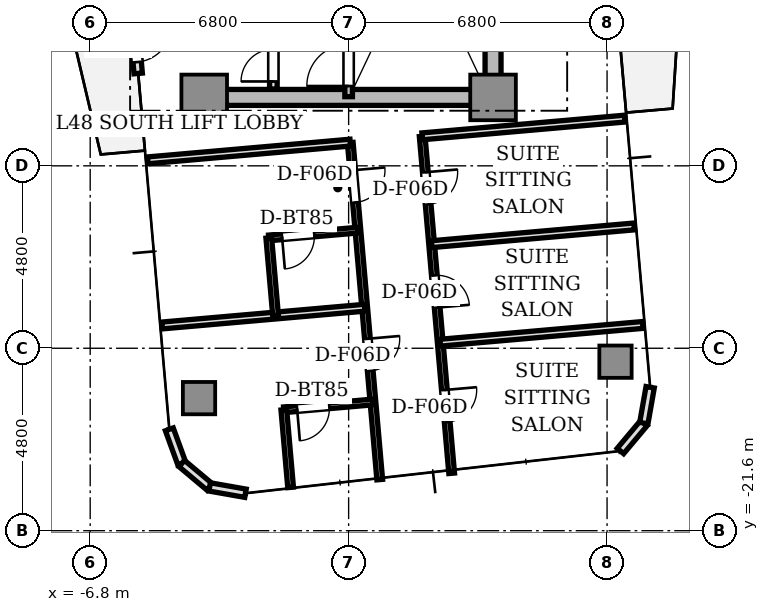
"""IFC4 building model, lengths in metres.
Left out: names, types, materials, properties, quantities, classifications, styles, units other than length and angle.
Written with IfcOpenShell. Run it as: python <this file> out.ifc"""

import sys

from ifc_helpers import new_model, si_unit, direction, frame, frame_2d, origin, origin_2d, place, context, subcontext, project, spatial, rectangle, extrude, source, transform, mapped, element, fill, save


model = new_model("IFC4")
c1 = context("Model", 3, precision=1e-05, world=origin(), true_north=direction((0.0, 1.0)))
c2 = subcontext(c1, "Body", "Model", "MODEL_VIEW")
j1 = project(units=[si_unit("LENGTHUNIT", "METRE"), si_unit("PLANEANGLEUNIT", "RADIAN")], contexts=[c1])
p1 = place(None, origin())
s1 = spatial("IfcSite", under=j1, at=p1, CompositionType="ELEMENT")
p2 = place(p1, origin())
s2 = spatial("IfcBuilding", under=s1, at=p2, CompositionType="ELEMENT")
p3 = place(p2, frame((0.0, 0.0, 175.2)))
s3 = spatial("IfcBuildingStorey", under=s2, at=p3, CompositionType="ELEMENT", Elevation=175.2)
p4 = place(p3, frame((-3.55, -10.2, 0.0), z_axis=(0.0, 0.0, 1.0), x_axis=(1.0, 0.0, 0.0)))
e1 = element("IfcWall", 1, at=p4, inside=s3, PredefinedType="SHEAR", context=c2, shape_type="SweptSolid", body=[
    extrude(rectangle(XDim=7.1, YDim=0.42, at=frame_2d((3.55, 0.0))), origin(), (0.0, 0.0, 1.0), 3.11),
])
p5 = place(p3, frame((3.8, -9.75, 0.0), z_axis=(0.0, 0.0, 1.0), x_axis=(0.0, 1.0, 0.0)))
e2 = element("IfcWall", 2, at=p5, inside=s3, PredefinedType="SHEAR", context=c2, shape_type="SweptSolid", body=[
    extrude(rectangle(XDim=6.9, YDim=0.42, at=frame_2d((3.45, 0.0))), origin(), (0.0, 0.0, 1.0), 3.11),
])
m1 = source(origin(), c2, "Body", "SweptSolid", [
    extrude(rectangle(XDim=1.2, YDim=1.2, at=origin_2d()), origin(), (0.0, 0.0, 1.0), 3.11),
])
for number, where, z_axis, x_axis in (
    (3, (-3.8, -10.2, 0.0), (0.0, 0.0, 1.0), (1.0, 0.0, 0.0)),
    (4, (3.8, -10.2, 0.0), (0.0, 0.0, 1.0), (1.0, 0.0, 0.0)),
):
    element("IfcColumn", number, at=place(p3, frame(where, z_axis=z_axis, x_axis=x_axis)), inside=s3, PredefinedType="COLUMN", context=c2, shape_type="MappedRepresentation", body=[
        mapped(m1, transform((0.0, 0.0, 0.0), scale=1.0)),
    ])
m2 = source(origin(), c2, "Body", "SweptSolid", [
    extrude(rectangle(XDim=0.85, YDim=0.85, at=origin_2d()), origin(), (0.0, 0.0, 1.0), 3.11),
])
for number, where, z_axis, x_axis in (
    (5, (-3.936, -18.112, 0.0), (0.0, 0.0, 1.0), (1.0, 0.0, 0.0)),
    (6, (7.022, -17.153, 0.0), (0.0, 0.0, 1.0), (1.0, 0.0, 0.0)),
):
    element("IfcColumn", number, at=place(p3, frame(where, z_axis=z_axis, x_axis=x_axis)), inside=s3, PredefinedType="COLUMN", context=c2, shape_type="MappedRepresentation", body=[
        mapped(m2, transform((0.0, 0.0, 0.0), scale=1.0)),
    ])
p6 = place(p3, frame((-5.772, -6.879, 0.0), z_axis=(0.0, 0.0, 1.0), x_axis=(0.087168071984, -0.996193619346, 0.0)))
e7 = element("IfcWall", 7, at=p6, inside=s3, PredefinedType="STANDARD", context=c2, shape_type="SweptSolid", body=[
    extrude(rectangle(XDim=2.7, YDim=0.22, at=frame_2d((1.35, 0.0))), origin(), (0.0, 0.0, 1.0), 3.11),
])
p7 = place(p6, frame((1.4, 0.0, 0.0)))
e8 = element("IfcOpeningElement", 8, at=p7, cuts=e7, PredefinedType="OPENING", context=c2, shape_type="SweptSolid", body=[
    extrude(rectangle(XDim=1.0, YDim=2.2, at=frame_2d((0.5, 1.1))), frame((0.0, 0.12, 0.0), z_axis=(0.0, -1.0, 0.0), x_axis=(1.0, 0.0, 0.0)), (0.0, 0.0, 1.0), 0.24),
])
p8 = place(p3, frame((-4.718, -18.933, 0.0), z_axis=(0.0, 0.0, 1.0), x_axis=(0.34188635151, -0.939741306239, 0.0)))
e9 = element("IfcWall", 9, at=p8, inside=s3, PredefinedType="STANDARD", context=c2, shape_type="SweptSolid", body=[
    extrude(rectangle(XDim=0.958, YDim=0.22, at=frame_2d((0.479, 0.0))), origin(), (0.0, 0.0, 1.0), 3.11),
])
for number, where, z_axis, x_axis in (
    (10, (-4.39, -19.833, 0.0), (0.0, 0.0, 1.0), (0.766, -0.643, 0.0)),
    (11, (-3.657, -20.449, 0.0), (0.0, 0.0, 1.0), (0.985, -0.174, 0.0)),
):
    element("IfcWall", number, at=place(p3, frame(where, z_axis=z_axis, x_axis=x_axis)), inside=s3, PredefinedType="STANDARD", context=c2, shape_type="SweptSolid", body=[
        extrude(rectangle(XDim=0.958, YDim=0.22, at=frame_2d((0.479, 0.0))), origin(), (0.0, 0.0, 1.0), 3.11),
    ])
for number, where, z_axis, x_axis in (
    (12, (7.152, -19.503, 0.0), (0.0, 0.0, 1.0), (0.643, 0.766, 0.0)),
    (13, (7.768, -18.769, 0.0), (0.0, 0.0, 1.0), (0.174, 0.985, 0.0)),
):
    element("IfcWall", number, at=place(p3, frame(where, z_axis=z_axis, x_axis=x_axis)), inside=s3, PredefinedType="STANDARD", context=c2, shape_type="SweptSolid", body=[
        extrude(rectangle(XDim=0.958, YDim=0.22, at=frame_2d((0.479, 0.0))), origin(), (0.0, 0.0, 1.0), 3.11),
    ])
p9 = place(p3, frame((0.0, -10.18, 0.0), z_axis=(0.0, 0.0, 1.0), x_axis=(0.0, 1.0, 0.0)))
e14 = element("IfcWall", 14, at=p9, inside=s3, PredefinedType="SOLIDWALL", context=c2, shape_type="SweptSolid", body=[
    extrude(rectangle(XDim=7.68, YDim=0.2, at=frame_2d((3.84, 0.0))), origin(), (0.0, 0.0, 1.0), 3.11),
])
p10 = place(p9, frame((0.28, 0.0, 0.0)))
e15 = element("IfcOpeningElement", 15, at=p10, cuts=e14, PredefinedType="OPENING", context=c2, shape_type="SweptSolid", body=[
    extrude(rectangle(XDim=1.1, YDim=2.15, at=frame_2d((0.55, 1.075))), frame((0.0, 0.11, 0.0), z_axis=(0.0, -1.0, 0.0), x_axis=(1.0, 0.0, 0.0)), (0.0, 0.0, 1.0), 0.22),
])
p11 = place(p3, frame((-1.98, -9.98, 0.0), z_axis=(0.0, 0.0, 1.0), x_axis=(0.0, 1.0, 0.0)))
e16 = element("IfcWall", 16, at=p11, inside=s3, PredefinedType="SOLIDWALL", context=c2, shape_type="SweptSolid", body=[
    extrude(rectangle(XDim=4.66, YDim=0.2, at=frame_2d((2.33, 0.0))), origin(), (0.0, 0.0, 1.0), 2.66),
])
p12 = place(p11, frame((0.2, 0.0, 0.0)))
e17 = element("IfcOpeningElement", 17, at=p12, cuts=e16, PredefinedType="OPENING", context=c2, shape_type="SweptSolid", body=[
    extrude(rectangle(XDim=0.85, YDim=2.1, at=frame_2d((0.425, 1.05))), frame((0.0, 0.11, 0.0), z_axis=(0.0, -1.0, 0.0), x_axis=(1.0, 0.0, 0.0)), (0.0, 0.0, 1.0), 0.22),
])
p13 = place(p3, frame((1.936, -11.224, 0.0), z_axis=(0.0, 0.0, 1.0), x_axis=(0.087151636982, -0.996195057291, 0.0)))
e18 = element("IfcWall", 18, at=p13, inside=s3, PredefinedType="PARTITIONING", context=c2, shape_type="SweptSolid", body=[
    extrude(rectangle(XDim=8.9, YDim=0.15, at=frame_2d((4.45, 0.0))), origin(), (0.0, 0.0, 1.0), 2.66),
])
p14 = place(p13, frame((0.949, 0.0, 0.0)))
e19 = element("IfcOpeningElement", 19, at=p14, cuts=e18, PredefinedType="OPENING", context=c2, shape_type="SweptSolid", body=[
    extrude(rectangle(XDim=0.85, YDim=2.1, at=frame_2d((0.425, 1.05))), frame((0.0, 0.085, 0.0), z_axis=(0.0, -1.0, 0.0), x_axis=(1.0, 0.0, 0.0)), (0.0, 0.0, 1.0), 0.17),
])
p15 = place(p13, frame((3.674, 0.0, 0.0)))
e20 = element("IfcOpeningElement", 20, at=p15, cuts=e18, PredefinedType="OPENING", context=c2, shape_type="SweptSolid", body=[
    extrude(rectangle(XDim=0.85, YDim=2.1, at=frame_2d((0.425, 1.05))), frame((0.0, 0.085, 0.0), z_axis=(0.0, -1.0, 0.0), x_axis=(1.0, 0.0, 0.0)), (0.0, 0.0, 1.0), 0.17),
])
p16 = place(p13, frame((6.7, 0.0, 0.0)))
e21 = element("IfcOpeningElement", 21, at=p16, cuts=e18, PredefinedType="OPENING", context=c2, shape_type="SweptSolid", body=[
    extrude(rectangle(XDim=0.85, YDim=2.1, at=frame_2d((0.425, 1.05))), frame((0.0, 0.085, 0.0), z_axis=(0.0, -1.0, 0.0), x_axis=(1.0, 0.0, 0.0)), (0.0, 0.0, 1.0), 0.17),
])
p17 = place(p3, frame((0.043, -11.39, 0.0), z_axis=(0.0, 0.0, 1.0), x_axis=(0.087178860582, -0.996192675273, 0.0)))
e22 = element("IfcWall", 22, at=p17, inside=s3, PredefinedType="PARTITIONING", context=c2, shape_type="SweptSolid", body=[
    extrude(rectangle(XDim=8.9, YDim=0.15, at=frame_2d((4.45, 0.0))), origin(), (0.0, 0.0, 1.0), 2.66),
])
p18 = place(p17, frame((0.73, 0.0, 0.0)))
e23 = element("IfcOpeningElement", 23, at=p18, cuts=e22, PredefinedType="OPENING", context=c2, shape_type="SweptSolid", body=[
    extrude(rectangle(XDim=0.85, YDim=2.1, at=frame_2d((0.425, 1.05))), frame((0.0, 0.085, 0.0), z_axis=(0.0, -1.0, 0.0), x_axis=(1.0, 0.0, 0.0)), (0.0, 0.0, 1.0), 0.17),
])
p19 = place(p17, frame((5.181, 0.0, 0.0)))
e24 = element("IfcOpeningElement", 24, at=p19, cuts=e22, PredefinedType="OPENING", context=c2, shape_type="SweptSolid", body=[
    extrude(rectangle(XDim=0.85, YDim=2.1, at=frame_2d((0.425, 1.05))), frame((0.0, 0.085, 0.0), z_axis=(0.0, -1.0, 0.0), x_axis=(1.0, 0.0, 0.0)), (0.0, 0.0, 1.0), 0.17),
])
for number, where, z_axis, x_axis in (
    (25, (1.936, -11.224, 0.0), (0.0, 0.0, 1.0), (0.996, 0.087, 0.0)),
    (26, (-5.287, -11.856, 0.0), (0.0, 0.0, 1.0), (0.996, 0.087, 0.0)),
    (27, (2.184, -14.061, 0.0), (0.0, 0.0, 1.0), (0.996, 0.087, 0.0)),
    (28, (2.411, -16.653, 0.0), (0.0, 0.0, 1.0), (0.996, 0.087, 0.0)),
    (29, (0.423, -15.734, 0.0), (0.0, 0.0, 1.0), (-0.996, -0.087, 0.0)),
):
    element("IfcWall", number, at=place(p3, frame(where, z_axis=z_axis, x_axis=x_axis)), inside=s3, PredefinedType="PARTITIONING", context=c2, shape_type="SweptSolid", body=[
        extrude(rectangle(XDim=5.35, YDim=0.18, at=frame_2d((2.675, 0.0))), origin(), (0.0, 0.0, 1.0), 2.66),
    ])
p20 = place(p3, frame((0.244, -13.692, 0.0), z_axis=(0.0, 0.0, 1.0), x_axis=(-0.996197656711, -0.087121918963, 0.0)))
e30 = element("IfcWall", 30, at=p20, inside=s3, PredefinedType="PARTITIONING", context=c2, shape_type="SweptSolid", body=[
    extrude(rectangle(XDim=2.354, YDim=0.15, at=frame_2d((1.177, 0.0))), origin(), (0.0, 0.0, 1.0), 2.66),
])
p21 = place(p20, frame((1.154, 0.0, 0.0)))
e31 = element("IfcOpeningElement", 31, at=p21, cuts=e30, PredefinedType="OPENING", context=c2, shape_type="SweptSolid", body=[
    extrude(rectangle(XDim=0.85, YDim=2.1, at=frame_2d((0.425, 1.05))), frame((0.0, 0.085, 0.0), z_axis=(0.0, -1.0, 0.0), x_axis=(1.0, 0.0, 0.0)), (0.0, 0.0, 1.0), 0.17),
])
p22 = place(p3, frame((-2.101, -13.897, 0.0), z_axis=(0.0, 0.0, 1.0), x_axis=(0.087174336889, -0.99619307114, 0.0)))
e32 = element("IfcWall", 32, at=p22, inside=s3, PredefinedType="PARTITIONING", context=c2, shape_type="SweptSolid", body=[
    extrude(rectangle(XDim=2.05, YDim=0.15, at=frame_2d((1.025, 0.0))), origin(), (0.0, 0.0, 1.0), 2.66),
])
p23 = place(p3, frame((0.64, -18.213, 0.0), z_axis=(0.0, 0.0, 1.0), x_axis=(-0.996188649846, -0.087224846905, 0.0)))
e33 = element("IfcWall", 33, at=p23, inside=s3, PredefinedType="PARTITIONING", context=c2, shape_type="SweptSolid", body=[
    extrude(rectangle(XDim=2.354, YDim=0.15, at=frame_2d((1.177, 0.0))), origin(), (0.0, 0.0, 1.0), 2.66),
])
p24 = place(p23, frame((1.154, 0.0, 0.0)))
e34 = element("IfcOpeningElement", 34, at=p24, cuts=e33, PredefinedType="OPENING", context=c2, shape_type="SweptSolid", body=[
    extrude(rectangle(XDim=0.85, YDim=2.1, at=frame_2d((0.425, 1.05))), frame((0.0, 0.085, 0.0), z_axis=(0.0, -1.0, 0.0), x_axis=(1.0, 0.0, 0.0)), (0.0, 0.0, 1.0), 0.17),
])
p25 = place(p3, frame((-1.705, -18.419, 0.0), z_axis=(0.0, 0.0, 1.0), x_axis=(0.087056149438, -0.996203406361, 0.0)))
e35 = element("IfcWall", 35, at=p25, inside=s3, PredefinedType="PARTITIONING", context=c2, shape_type="SweptSolid", body=[
    extrude(rectangle(XDim=2.05, YDim=0.15, at=frame_2d((1.025, 0.0))), origin(), (0.0, 0.0, 1.0), 2.66),
])
m3 = source(origin(), c2, "Body", "SweptSolid", [
    extrude(rectangle(XDim=1.0, YDim=0.05, at=origin_2d()), origin(), (0.0, 0.0, 1.0), 2.2),
])
p26 = place(p7, frame((0.5, 0.0, 0.0)))
e36 = element("IfcDoor", 36, at=p26, inside=s3, OperationType="SINGLE_SWING_LEFT", PredefinedType="DOOR", context=c2, shape_type="MappedRepresentation", body=[
    mapped(m3, transform((0.0, 0.0, 0.0), scale=1.0)),
])
fill(e8, e36)
m4 = source(origin(), c2, "Body", "SweptSolid", [
    extrude(rectangle(XDim=1.1, YDim=0.05, at=origin_2d()), origin(), (0.0, 0.0, 1.0), 2.15),
])
p27 = place(p10, frame((0.55, 0.0, 0.0)))
e37 = element("IfcDoor", 37, at=p27, inside=s3, OperationType="SINGLE_SWING_LEFT", PredefinedType="DOOR", context=c2, shape_type="MappedRepresentation", body=[
    mapped(m4, transform((0.0, 0.0, 0.0), scale=1.0)),
])
fill(e15, e37)
m5 = source(origin(), c2, "Body", "SweptSolid", [
    extrude(rectangle(XDim=0.85, YDim=0.05, at=origin_2d()), origin(), (0.0, 0.0, 1.0), 2.1),
])
p28 = place(p12, frame((0.425, 0.0, 0.0)))
e38 = element("IfcDoor", 38, at=p28, inside=s3, OperationType="SINGLE_SWING_LEFT", PredefinedType="DOOR", context=c2, shape_type="MappedRepresentation", body=[
    mapped(m5, transform((0.0, 0.0, 0.0), scale=1.0)),
])
fill(e17, e38)
p29 = place(p14, frame((0.425, 0.0, 0.0)))
e39 = element("IfcDoor", 39, at=p29, inside=s3, OperationType="SINGLE_SWING_LEFT", PredefinedType="DOOR", context=c2, shape_type="MappedRepresentation", body=[
    mapped(m5, transform((0.0, 0.0, 0.0), scale=1.0)),
])
fill(e19, e39)
p30 = place(p15, frame((0.425, 0.0, 0.0)))
e40 = element("IfcDoor", 40, at=p30, inside=s3, OperationType="SINGLE_SWING_RIGHT", PredefinedType="DOOR", context=c2, shape_type="MappedRepresentation", body=[
    mapped(m5, transform((0.0, 0.0, 0.0), scale=1.0)),
])
fill(e20, e40)
p31 = place(p16, frame((0.425, 0.0, 0.0)))
e41 = element("IfcDoor", 41, at=p31, inside=s3, OperationType="SINGLE_SWING_LEFT", PredefinedType="DOOR", context=c2, shape_type="MappedRepresentation", body=[
    mapped(m5, transform((0.0, 0.0, 0.0), scale=1.0)),
])
fill(e21, e41)
p32 = place(p21, frame((0.425, 0.0, 0.0)))
e42 = element("IfcDoor", 42, at=p32, inside=s3, OperationType="SINGLE_SWING_RIGHT", PredefinedType="DOOR", context=c2, shape_type="MappedRepresentation", body=[
    mapped(m5, transform((0.0, 0.0, 0.0), scale=1.0)),
])
fill(e31, e42)
p33 = place(p18, frame((0.425, 0.0, 0.0)))
e43 = element("IfcDoor", 43, at=p33, inside=s3, OperationType="SINGLE_SWING_LEFT", PredefinedType="DOOR", context=c2, shape_type="MappedRepresentation", body=[
    mapped(m5, transform((0.0, 0.0, 0.0), scale=1.0)),
])
fill(e23, e43)
p34 = place(p24, frame((0.425, 0.0, 0.0)))
e44 = element("IfcDoor", 44, at=p34, inside=s3, OperationType="SINGLE_SWING_RIGHT", PredefinedType="DOOR", context=c2, shape_type="MappedRepresentation", body=[
    mapped(m5, transform((0.0, 0.0, 0.0), scale=1.0)),
])
fill(e34, e44)
p35 = place(p19, frame((0.425, 0.0, 0.0)))
e45 = element("IfcDoor", 45, at=p35, inside=s3, OperationType="SINGLE_SWING_LEFT", PredefinedType="DOOR", context=c2, shape_type="MappedRepresentation", body=[
    mapped(m5, transform((0.0, 0.0, 0.0), scale=1.0)),
])
fill(e24, e45)
save(model, sys.argv[1])
